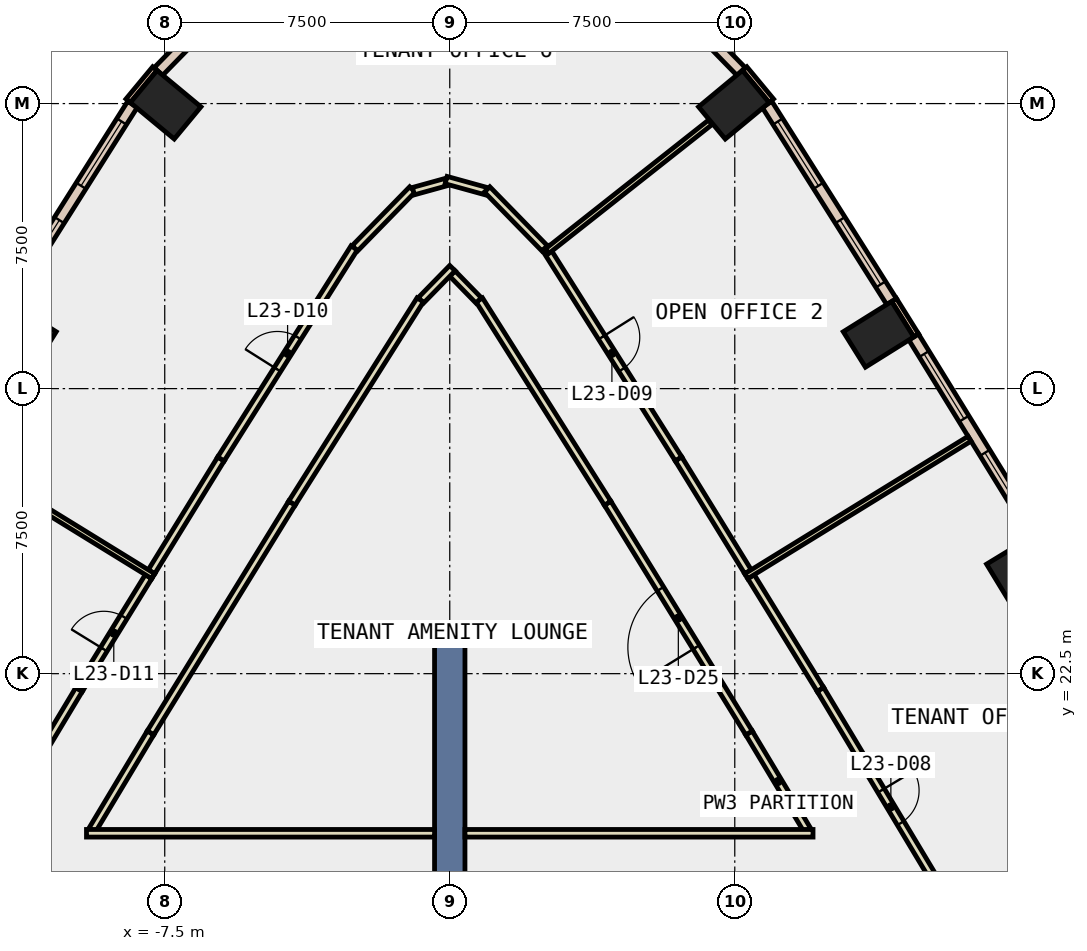
"""IFC4 building model, lengths in metres.
Left out: names, types, materials, properties, quantities, classifications, styles, units other than length and angle.
Written with IfcOpenShell. Run it as: python <this file> out.ifc"""

import sys

from ifc_helpers import new_model, si_unit, direction, frame, frame_2d, origin, origin_2d, place, context, subcontext, project, spatial, rectangle, extrude, element, fill, save


model = new_model("IFC4")
c1 = context("Model", 3, precision=1e-05, world=origin(), true_north=direction((0.0, 1.0)))
c2 = subcontext(c1, "Body", "Model", "MODEL_VIEW")
j1 = project(units=[si_unit("LENGTHUNIT", "METRE"), si_unit("PLANEANGLEUNIT", "RADIAN")], contexts=[c1])
p1 = place(None, origin())
s1 = spatial("IfcSite", under=j1, at=p1, CompositionType="ELEMENT")
p2 = place(p1, origin())
s2 = spatial("IfcBuilding", under=s1, at=p2, CompositionType="ELEMENT")
p3 = place(p2, frame((0.0, 0.0, 107.6)))
s3 = spatial("IfcBuildingStorey", under=s2, at=p3, CompositionType="ELEMENT", Elevation=107.6)
for number, where, z_axis, x_axis in (
    (1, (15.053, 25.302, -0.4), (0.0, 0.0, 1.0), (-0.52, 0.854, 0.0)),
    (2, (11.283, 31.428, -0.4), (0.0, 0.0, 1.0), (-0.53, 0.848, 0.0)),
    (3, (7.476, 37.47, -0.4), (0.0, 0.0, 1.0), (-0.638, 0.77, 0.0)),
    (4, (-7.476, 37.47, -0.4), (0.0, 0.0, 1.0), (0.638, 0.77, 0.0)),
    (5, (-11.283, 31.428, -0.4), (0.0, 0.0, 1.0), (0.53, 0.848, 0.0)),
):
    element("IfcColumn", number, at=place(p3, frame(where, z_axis=z_axis, x_axis=x_axis)), inside=s3, PredefinedType="COLUMN", context=c2, shape_type="SweptSolid", body=[
        extrude(rectangle(XDim=1.1, YDim=1.5, at=origin_2d()), origin(), (0.0, 0.0, 1.0), 4.2),
    ])
p4 = place(p3, frame((0.0, 14.5, -0.4), z_axis=(0.0, 0.0, 1.0), x_axis=(0.0, 1.0, 0.0)))
e6 = element("IfcWall", 6, at=p4, inside=s3, PredefinedType="SHEAR", context=c2, shape_type="SweptSolid", body=[
    extrude(rectangle(XDim=9.0, YDim=0.8, at=frame_2d((4.5, 0.0))), origin(), (0.0, 0.0, 1.0), 4.2),
])
p5 = place(p3, frame((12.274, 31.399, 0.0), z_axis=(0.0, 0.0, 1.0), x_axis=(-0.529879262372, 0.848073090782, 0.0)))
e7 = element("IfcWall", 7, at=p5, inside=s3, PredefinedType="STANDARD", context=c2, shape_type="SweptSolid", body=[
    extrude(rectangle(XDim=1.1, YDim=0.15, at=frame_2d((0.55, 0.0))), origin(), (0.0, 0.0, 1.0), 3.8),
])
for number, where, z_axis, x_axis in (
    (8, (8.462, 37.574, 0.0), (0.0, 0.0, 1.0), (-0.639, 0.77, 0.0)),
    (9, (-7.76, 38.42, 0.0), (0.0, 0.0, 1.0), (-0.639, -0.77, 0.0)),
):
    element("IfcWall", number, at=place(p3, frame(where, z_axis=z_axis, x_axis=x_axis)), inside=s3, PredefinedType="STANDARD", context=c2, shape_type="SweptSolid", body=[
        extrude(rectangle(XDim=1.099, YDim=0.15, at=frame_2d((0.55, 0.0))), origin(), (0.0, 0.0, 1.0), 3.8),
    ])
p6 = place(p3, frame((15.406, 26.16, 0.0), z_axis=(0.0, 0.0, 1.0), x_axis=(-0.524121974895, 0.851643208998, 0.0)))
e10 = element("IfcWall", 10, at=p6, inside=s3, PredefinedType="STANDARD", context=c2, shape_type="SweptSolid", body=[
    extrude(rectangle(XDim=6.104, YDim=0.3, at=frame_2d((3.052, 0.0))), origin(), (0.0, 0.0, 1.0), 3.8),
])
p7 = place(p6, frame((0.526, 0.0, 0.9)))
e11 = element("IfcOpeningElement", 11, at=p7, cuts=e10, PredefinedType="OPENING", context=c2, shape_type="SweptSolid", body=[
    extrude(rectangle(XDim=2.0, YDim=2.6, at=frame_2d((1.0, 1.3))), frame((0.0, 0.16, 0.0), z_axis=(0.0, -1.0, 0.0), x_axis=(1.0, 0.0, 0.0)), (0.0, 0.0, 1.0), 0.32),
])
p8 = place(p6, frame((3.578, 0.0, 0.9)))
e12 = element("IfcOpeningElement", 12, at=p8, cuts=e10, PredefinedType="OPENING", context=c2, shape_type="SweptSolid", body=[
    extrude(rectangle(XDim=2.0, YDim=2.6, at=frame_2d((1.0, 1.3))), frame((0.0, 0.16, 0.0), z_axis=(0.0, -1.0, 0.0), x_axis=(1.0, 0.0, 0.0)), (0.0, 0.0, 1.0), 0.32),
])
p9 = place(p3, frame((11.626, 32.29, 0.0), z_axis=(0.0, 0.0, 1.0), x_axis=(-0.534018429465, 0.845472836342, 0.0)))
e13 = element("IfcWall", 13, at=p9, inside=s3, PredefinedType="STANDARD", context=c2, shape_type="SweptSolid", body=[
    extrude(rectangle(XDim=6.138, YDim=0.3, at=frame_2d((3.069, 0.0))), origin(), (0.0, 0.0, 1.0), 3.8),
])
p10 = place(p9, frame((0.535, 0.0, 0.9)))
e14 = element("IfcOpeningElement", 14, at=p10, cuts=e13, PredefinedType="OPENING", context=c2, shape_type="SweptSolid", body=[
    extrude(rectangle(XDim=2.0, YDim=2.6, at=frame_2d((1.0, 1.3))), frame((0.0, 0.16, 0.0), z_axis=(0.0, -1.0, 0.0), x_axis=(1.0, 0.0, 0.0)), (0.0, 0.0, 1.0), 0.32),
])
p11 = place(p9, frame((3.604, 0.0, 0.9)))
e15 = element("IfcOpeningElement", 15, at=p11, cuts=e13, PredefinedType="OPENING", context=c2, shape_type="SweptSolid", body=[
    extrude(rectangle(XDim=2.0, YDim=2.6, at=frame_2d((1.0, 1.3))), frame((0.0, 0.16, 0.0), z_axis=(0.0, -1.0, 0.0), x_axis=(1.0, 0.0, 0.0)), (0.0, 0.0, 1.0), 0.32),
])
p12 = place(p3, frame((7.668, 38.343, 0.0), z_axis=(0.0, 0.0, 1.0), x_axis=(-0.698695735804, 0.715418946331, 0.0)))
e16 = element("IfcWall", 16, at=p12, inside=s3, PredefinedType="STANDARD", context=c2, shape_type="SweptSolid", body=[
    extrude(rectangle(XDim=3.65, YDim=0.3, at=frame_2d((1.825, 0.0))), origin(), (0.0, 0.0, 1.0), 3.8),
])
p13 = place(p12, frame((1.125, 0.0, 0.9)))
e17 = element("IfcOpeningElement", 17, at=p13, cuts=e16, PredefinedType="OPENING", context=c2, shape_type="SweptSolid", body=[
    extrude(rectangle(XDim=1.4, YDim=2.6, at=frame_2d((0.7, 1.3))), frame((0.0, 0.16, 0.0), z_axis=(0.0, -1.0, 0.0), x_axis=(1.0, 0.0, 0.0)), (0.0, 0.0, 1.0), 0.32),
])
p14 = place(p3, frame((-5.118, 40.954, 0.0), z_axis=(0.0, 0.0, 1.0), x_axis=(-0.698695735804, -0.715418946331, 0.0)))
e18 = element("IfcWall", 18, at=p14, inside=s3, PredefinedType="STANDARD", context=c2, shape_type="SweptSolid", body=[
    extrude(rectangle(XDim=3.65, YDim=0.3, at=frame_2d((1.825, 0.0))), origin(), (0.0, 0.0, 1.0), 3.8),
])
p15 = place(p14, frame((1.125, 0.0, 0.9)))
e19 = element("IfcOpeningElement", 19, at=p15, cuts=e18, PredefinedType="OPENING", context=c2, shape_type="SweptSolid", body=[
    extrude(rectangle(XDim=1.4, YDim=2.6, at=frame_2d((0.7, 1.3))), frame((0.0, 0.16, 0.0), z_axis=(0.0, -1.0, 0.0), x_axis=(1.0, 0.0, 0.0)), (0.0, 0.0, 1.0), 0.32),
])
p16 = place(p3, frame((-8.348, 37.48, 0.0), z_axis=(0.0, 0.0, 1.0), x_axis=(-0.534018429465, -0.845472836342, 0.0)))
e20 = element("IfcWall", 20, at=p16, inside=s3, PredefinedType="STANDARD", context=c2, shape_type="SweptSolid", body=[
    extrude(rectangle(XDim=6.138, YDim=0.3, at=frame_2d((3.069, 0.0))), origin(), (0.0, 0.0, 1.0), 3.8),
])
p17 = place(p16, frame((0.535, 0.0, 0.9)))
e21 = element("IfcOpeningElement", 21, at=p17, cuts=e20, PredefinedType="OPENING", context=c2, shape_type="SweptSolid", body=[
    extrude(rectangle(XDim=2.0, YDim=2.6, at=frame_2d((1.0, 1.3))), frame((0.0, 0.16, 0.0), z_axis=(0.0, -1.0, 0.0), x_axis=(1.0, 0.0, 0.0)), (0.0, 0.0, 1.0), 0.32),
])
p18 = place(p16, frame((3.604, 0.0, 0.9)))
e22 = element("IfcOpeningElement", 22, at=p18, cuts=e20, PredefinedType="OPENING", context=c2, shape_type="SweptSolid", body=[
    extrude(rectangle(XDim=2.0, YDim=2.6, at=frame_2d((1.0, 1.3))), frame((0.0, 0.16, 0.0), z_axis=(0.0, -1.0, 0.0), x_axis=(1.0, 0.0, 0.0)), (0.0, 0.0, 1.0), 0.32),
])
p19 = place(p3, frame((9.407, 18.386, 0.0), z_axis=(0.0, 0.0, 1.0), x_axis=(-0.514399309837, 0.857550785691, 0.0)))
e23 = element("IfcWall", 23, at=p19, inside=s3, PredefinedType="PARTITIONING", context=c2, shape_type="SweptSolid", body=[
    extrude(rectangle(XDim=2.978, YDim=0.2, at=frame_2d((1.489, 0.0))), origin(), (0.0, 0.0, 1.0), 3.8),
])
p20 = place(p3, frame((7.875, 20.94, 0.0), z_axis=(0.0, 0.0, 1.0), x_axis=(-0.524183774504, 0.851605172921, 0.0)))
e24 = element("IfcWall", 24, at=p20, inside=s3, PredefinedType="PARTITIONING", context=c2, shape_type="SweptSolid", body=[
    extrude(rectangle(XDim=7.099, YDim=0.2, at=frame_2d((3.549, 0.0))), origin(), (0.0, 0.0, 1.0), 3.8),
])
p21 = place(p20, frame((2.649, 0.0, 0.0)))
e25 = element("IfcOpeningElement", 25, at=p21, cuts=e24, PredefinedType="OPENING", context=c2, shape_type="SweptSolid", body=[
    extrude(rectangle(XDim=1.8, YDim=2.1, at=frame_2d((0.9, 1.05))), frame((0.0, 0.11, 0.0), z_axis=(0.0, -1.0, 0.0), x_axis=(1.0, 0.0, 0.0)), (0.0, 0.0, 1.0), 0.22),
])
p22 = place(p3, frame((4.154, 26.985, 0.0), z_axis=(0.0, 0.0, 1.0), x_axis=(-0.53384777413, 0.84558060175, 0.0)))
e26 = element("IfcWall", 26, at=p22, inside=s3, PredefinedType="PARTITIONING", context=c2, shape_type="SweptSolid", body=[
    extrude(rectangle(XDim=6.326, YDim=0.2, at=frame_2d((3.163, 0.0))), origin(), (0.0, 0.0, 1.0), 3.8),
])
p23 = place(p3, frame((0.76, 32.321, 0.0), z_axis=(0.0, 0.0, 1.0), x_axis=(-0.698898447714, 0.715220916769, 0.0)))
e27 = element("IfcWall", 27, at=p23, inside=s3, PredefinedType="PARTITIONING", context=c2, shape_type="SweptSolid", body=[
    extrude(rectangle(XDim=0.987, YDim=0.2, at=frame_2d((0.494, 0.0))), origin(), (0.0, 0.0, 1.0), 3.8),
])
p24 = place(p3, frame((0.07, 33.17, 0.0), z_axis=(0.0, 0.0, 1.0), x_axis=(-0.699145664909, -0.714979257908, 0.0)))
e28 = element("IfcWall", 28, at=p24, inside=s3, PredefinedType="PARTITIONING", context=c2, shape_type="SweptSolid", body=[
    extrude(rectangle(XDim=1.187, YDim=0.2, at=frame_2d((0.594, 0.0))), origin(), (0.0, 0.0, 1.0), 3.8),
])
p25 = place(p3, frame((-0.777, 32.334, 0.0), z_axis=(0.0, 0.0, 1.0), x_axis=(-0.53384777413, -0.84558060175, 0.0)))
e29 = element("IfcWall", 29, at=p25, inside=s3, PredefinedType="PARTITIONING", context=c2, shape_type="SweptSolid", body=[
    extrude(rectangle(XDim=6.326, YDim=0.2, at=frame_2d((3.163, 0.0))), origin(), (0.0, 0.0, 1.0), 3.8),
])
p26 = place(p3, frame((-4.154, 26.985, 0.0), z_axis=(0.0, 0.0, 1.0), x_axis=(-0.524183774504, -0.851605172921, 0.0)))
e30 = element("IfcWall", 30, at=p26, inside=s3, PredefinedType="PARTITIONING", context=c2, shape_type="SweptSolid", body=[
    extrude(rectangle(XDim=7.099, YDim=0.2, at=frame_2d((3.549, 0.0))), origin(), (0.0, 0.0, 1.0), 3.8),
])
p27 = place(p3, frame((-7.875, 20.94, 0.0), z_axis=(0.0, 0.0, 1.0), x_axis=(-0.514399309837, -0.857550785691, 0.0)))
e31 = element("IfcWall", 31, at=p27, inside=s3, PredefinedType="PARTITIONING", context=c2, shape_type="SweptSolid", body=[
    extrude(rectangle(XDim=2.978, YDim=0.2, at=frame_2d((1.489, 0.0))), origin(), (0.0, 0.0, 1.0), 3.8),
])
p28 = place(p3, frame((7.927, 25.052, 0.0), z_axis=(0.0, 0.0, 1.0), x_axis=(0.524140390501, -0.851631875311, 0.0)))
e32 = element("IfcWall", 32, at=p28, inside=s3, PredefinedType="PARTITIONING", context=c2, shape_type="SweptSolid", body=[
    extrude(rectangle(XDim=3.487, YDim=0.2, at=frame_2d((1.744, 0.0))), origin(), (0.0, 0.0, 1.0), 3.8),
])
p29 = place(p3, frame((9.755, 22.082, 0.0), z_axis=(0.0, 0.0, 1.0), x_axis=(0.514582342012, -0.857440967816, 0.0)))
e33 = element("IfcWall", 33, at=p29, inside=s3, PredefinedType="PARTITIONING", context=c2, shape_type="SweptSolid", body=[
    extrude(rectangle(XDim=7.049, YDim=0.2, at=frame_2d((3.524, 0.0))), origin(), (0.0, 0.0, 1.0), 3.8),
])
p30 = place(p29, frame((3.1, 0.0, 0.0)))
e34 = element("IfcOpeningElement", 34, at=p30, cuts=e33, PredefinedType="OPENING", context=c2, shape_type="SweptSolid", body=[
    extrude(rectangle(XDim=1.0, YDim=2.1, at=frame_2d((0.5, 1.05))), frame((0.0, 0.11, 0.0), z_axis=(0.0, -1.0, 0.0), x_axis=(1.0, 0.0, 0.0)), (0.0, 0.0, 1.0), 0.22),
])
p31 = place(p3, frame((2.513, 33.705, 0.0), z_axis=(0.0, 0.0, 1.0), x_axis=(0.533874165031, -0.845563939577, 0.0)))
e35 = element("IfcWall", 35, at=p31, inside=s3, PredefinedType="PARTITIONING", context=c2, shape_type="SweptSolid", body=[
    extrude(rectangle(XDim=6.571, YDim=0.2, at=frame_2d((3.286, 0.0))), origin(), (0.0, 0.0, 1.0), 3.8),
])
p32 = place(p31, frame((2.785, 0.0, 0.0)))
e36 = element("IfcOpeningElement", 36, at=p32, cuts=e35, PredefinedType="OPENING", context=c2, shape_type="SweptSolid", body=[
    extrude(rectangle(XDim=1.0, YDim=2.1, at=frame_2d((0.5, 1.05))), frame((0.0, 0.11, 0.0), z_axis=(0.0, -1.0, 0.0), x_axis=(1.0, 0.0, 0.0)), (0.0, 0.0, 1.0), 0.22),
])
for number, where, z_axis, x_axis in (
    (37, (6.021, 28.149, 0.0), (0.0, 0.0, 1.0), (0.524, -0.852, 0.0)),
    (38, (-7.848, 25.18, 0.0), (0.0, 0.0, 1.0), (0.524, 0.852, 0.0)),
):
    element("IfcWall", number, at=place(p3, frame(where, z_axis=z_axis, x_axis=x_axis)), inside=s3, PredefinedType="PARTITIONING", context=c2, shape_type="SweptSolid", body=[
        extrude(rectangle(XDim=3.486, YDim=0.2, at=frame_2d((1.743, 0.0))), origin(), (0.0, 0.0, 1.0), 3.8),
    ])
p33 = place(p3, frame((-6.021, 28.149, 0.0), z_axis=(0.0, 0.0, 1.0), x_axis=(0.533874165031, 0.845563939577, 0.0)))
e39 = element("IfcWall", 39, at=p33, inside=s3, PredefinedType="PARTITIONING", context=c2, shape_type="SweptSolid", body=[
    extrude(rectangle(XDim=6.571, YDim=0.2, at=frame_2d((3.286, 0.0))), origin(), (0.0, 0.0, 1.0), 3.8),
])
p34 = place(p33, frame((2.785, 0.0, 0.0)))
e40 = element("IfcOpeningElement", 40, at=p34, cuts=e39, PredefinedType="OPENING", context=c2, shape_type="SweptSolid", body=[
    extrude(rectangle(XDim=1.0, YDim=2.1, at=frame_2d((0.5, 1.05))), frame((0.0, 0.11, 0.0), z_axis=(0.0, -1.0, 0.0), x_axis=(1.0, 0.0, 0.0)), (0.0, 0.0, 1.0), 0.22),
])
p35 = place(p3, frame((-2.496, 33.692, 0.0), z_axis=(0.0, 0.0, 1.0), x_axis=(0.698771726105, 0.715344724449, 0.0)))
e41 = element("IfcWall", 41, at=p35, inside=s3, PredefinedType="PARTITIONING", context=c2, shape_type="SweptSolid", body=[
    extrude(rectangle(XDim=2.166, YDim=0.2, at=frame_2d((1.083, 0.0))), origin(), (0.0, 0.0, 1.0), 3.8),
])
p36 = place(p3, frame((-0.956, 35.196, 0.0), z_axis=(0.0, 0.0, 1.0), x_axis=(0.963772226389, 0.266726630919, 0.0)))
e42 = element("IfcWall", 42, at=p36, inside=s3, PredefinedType="PARTITIONING", context=c2, shape_type="SweptSolid", body=[
    extrude(rectangle(XDim=0.892, YDim=0.2, at=frame_2d((0.446, 0.0))), origin(), (0.0, 0.0, 1.0), 3.8),
])
p37 = place(p3, frame((-0.096, 35.487, 0.0), z_axis=(0.0, 0.0, 1.0), x_axis=(0.963802560401, -0.266616999767, 0.0)))
e43 = element("IfcWall", 43, at=p37, inside=s3, PredefinedType="PARTITIONING", context=c2, shape_type="SweptSolid", body=[
    extrude(rectangle(XDim=1.092, YDim=0.2, at=frame_2d((0.546, 0.0))), origin(), (0.0, 0.0, 1.0), 3.8),
])
p38 = place(p3, frame((0.983, 35.241, 0.0), z_axis=(0.0, 0.0, 1.0), x_axis=(0.698771726105, -0.715344724449, 0.0)))
e44 = element("IfcWall", 44, at=p38, inside=s3, PredefinedType="PARTITIONING", context=c2, shape_type="SweptSolid", body=[
    extrude(rectangle(XDim=2.166, YDim=0.2, at=frame_2d((1.083, 0.0))), origin(), (0.0, 0.0, 1.0), 3.8),
])
p39 = place(p3, frame((-11.549, 19.092, 0.0), z_axis=(0.0, 0.0, 1.0), x_axis=(0.514536939864, 0.857468213705, 0.0)))
e45 = element("IfcWall", 45, at=p39, inside=s3, PredefinedType="PARTITIONING", context=c2, shape_type="SweptSolid", body=[
    extrude(rectangle(XDim=3.487, YDim=0.2, at=frame_2d((1.744, 0.0))), origin(), (0.0, 0.0, 1.0), 3.8),
])
p40 = place(p3, frame((-9.755, 22.082, 0.0), z_axis=(0.0, 0.0, 1.0), x_axis=(0.524140390501, 0.851631875311, 0.0)))
e46 = element("IfcWall", 46, at=p40, inside=s3, PredefinedType="PARTITIONING", context=c2, shape_type="SweptSolid", body=[
    extrude(rectangle(XDim=3.487, YDim=0.2, at=frame_2d((1.744, 0.0))), origin(), (0.0, 0.0, 1.0), 3.8),
])
p41 = place(p40, frame((1.244, 0.0, 0.0)))
e47 = element("IfcOpeningElement", 47, at=p41, cuts=e46, PredefinedType="OPENING", context=c2, shape_type="SweptSolid", body=[
    extrude(rectangle(XDim=1.0, YDim=2.1, at=frame_2d((0.5, 1.05))), frame((0.0, 0.11, 0.0), z_axis=(0.0, -1.0, 0.0), x_axis=(1.0, 0.0, 0.0)), (0.0, 0.0, 1.0), 0.22),
])
p42 = place(p3, frame((-9.559, 18.3, 0.0), z_axis=(0.0, 0.0, 1.0), x_axis=(1.0, 0.0, 0.0)))
e48 = element("IfcWall", 48, at=p42, inside=s3, PredefinedType="PARTITIONING", context=c2, shape_type="SweptSolid", body=[
    extrude(rectangle(XDim=9.159, YDim=0.2, at=frame_2d((4.58, 0.0))), origin(), (0.0, 0.0, 1.0), 3.8),
])
p43 = place(p3, frame((13.507, 16.025, 0.0), z_axis=(0.0, 0.0, 1.0), x_axis=(0.860289301319, 0.509806157315, 0.0)))
e49 = element("IfcWall", 49, at=p43, inside=s3, PredefinedType="PARTITIONING", context=c2, shape_type="SweptSolid", body=[
    extrude(rectangle(XDim=5.33, YDim=0.15, at=frame_2d((2.665, 0.0))), origin(), (0.0, 0.0, 1.0), 3.8),
])
p44 = place(p3, frame((7.802, 25.064, 0.0), z_axis=(0.0, 0.0, 1.0), x_axis=(0.851596352662, 0.524198103901, 0.0)))
e50 = element("IfcWall", 50, at=p44, inside=s3, PredefinedType="PARTITIONING", context=c2, shape_type="SweptSolid", body=[
    extrude(rectangle(XDim=6.9, YDim=0.15, at=frame_2d((3.45, 0.0))), origin(), (0.0, 0.0, 1.0), 3.8),
])
p45 = place(p3, frame((2.566, 33.62, 0.0), z_axis=(0.0, 0.0, 1.0), x_axis=(0.784838195876, 0.619700739304, 0.0)))
e51 = element("IfcWall", 51, at=p45, inside=s3, PredefinedType="PARTITIONING", context=c2, shape_type="SweptSolid", body=[
    extrude(rectangle(XDim=5.469, YDim=0.15, at=frame_2d((2.734, 0.0))), origin(), (0.0, 0.0, 1.0), 3.8),
])
p46 = place(p3, frame((-7.802, 25.064, 0.0), z_axis=(0.0, 0.0, 1.0), x_axis=(-0.851596352662, 0.524198103901, 0.0)))
e52 = element("IfcWall", 52, at=p46, inside=s3, PredefinedType="PARTITIONING", context=c2, shape_type="SweptSolid", body=[
    extrude(rectangle(XDim=6.9, YDim=0.15, at=frame_2d((3.45, 0.0))), origin(), (0.0, 0.0, 1.0), 3.8),
])
p47 = place(p3, frame((0.4, 18.3, 0.0), z_axis=(0.0, 0.0, 1.0), x_axis=(1.0, 0.0, 0.0)))
e53 = element("IfcWall", 53, at=p47, inside=s3, PredefinedType="PARTITIONING", context=c2, shape_type="SweptSolid", body=[
    extrude(rectangle(XDim=9.159, YDim=0.2, at=frame_2d((4.58, 0.0))), origin(), (0.0, 0.0, 1.0), 3.8),
])
p48 = place(p7, origin())
e54 = element("IfcWindow", 54, at=p48, inside=s3, PartitioningType="SINGLE_PANEL", PredefinedType="WINDOW", context=c2, shape_type="SweptSolid", body=[
    extrude(rectangle(XDim=2.0, YDim=2.6, at=frame_2d((1.0, 1.3))), frame((0.0, 0.03, 0.0), z_axis=(0.0, -1.0, 0.0), x_axis=(1.0, 0.0, 0.0)), (0.0, 0.0, 1.0), 0.06),
])
fill(e11, e54)
p49 = place(p8, origin())
e55 = element("IfcWindow", 55, at=p49, inside=s3, PartitioningType="SINGLE_PANEL", PredefinedType="WINDOW", context=c2, shape_type="SweptSolid", body=[
    extrude(rectangle(XDim=2.0, YDim=2.6, at=frame_2d((1.0, 1.3))), frame((0.0, 0.03, 0.0), z_axis=(0.0, -1.0, 0.0), x_axis=(1.0, 0.0, 0.0)), (0.0, 0.0, 1.0), 0.06),
])
fill(e12, e55)
p50 = place(p10, origin())
e56 = element("IfcWindow", 56, at=p50, inside=s3, PartitioningType="SINGLE_PANEL", PredefinedType="WINDOW", context=c2, shape_type="SweptSolid", body=[
    extrude(rectangle(XDim=2.0, YDim=2.6, at=frame_2d((1.0, 1.3))), frame((0.0, 0.03, 0.0), z_axis=(0.0, -1.0, 0.0), x_axis=(1.0, 0.0, 0.0)), (0.0, 0.0, 1.0), 0.06),
])
fill(e14, e56)
p51 = place(p11, origin())
e57 = element("IfcWindow", 57, at=p51, inside=s3, PartitioningType="SINGLE_PANEL", PredefinedType="WINDOW", context=c2, shape_type="SweptSolid", body=[
    extrude(rectangle(XDim=2.0, YDim=2.6, at=frame_2d((1.0, 1.3))), frame((0.0, 0.03, 0.0), z_axis=(0.0, -1.0, 0.0), x_axis=(1.0, 0.0, 0.0)), (0.0, 0.0, 1.0), 0.06),
])
fill(e15, e57)
p52 = place(p17, origin())
e58 = element("IfcWindow", 58, at=p52, inside=s3, PartitioningType="SINGLE_PANEL", PredefinedType="WINDOW", context=c2, shape_type="SweptSolid", body=[
    extrude(rectangle(XDim=2.0, YDim=2.6, at=frame_2d((1.0, 1.3))), frame((0.0, 0.03, 0.0), z_axis=(0.0, -1.0, 0.0), x_axis=(1.0, 0.0, 0.0)), (0.0, 0.0, 1.0), 0.06),
])
fill(e21, e58)
p53 = place(p18, origin())
e59 = element("IfcWindow", 59, at=p53, inside=s3, PartitioningType="SINGLE_PANEL", PredefinedType="WINDOW", context=c2, shape_type="SweptSolid", body=[
    extrude(rectangle(XDim=2.0, YDim=2.6, at=frame_2d((1.0, 1.3))), frame((0.0, 0.03, 0.0), z_axis=(0.0, -1.0, 0.0), x_axis=(1.0, 0.0, 0.0)), (0.0, 0.0, 1.0), 0.06),
])
fill(e22, e59)
p54 = place(p30, origin())
e60 = element("IfcDoor", 60, at=p54, inside=s3, OperationType="SINGLE_SWING_LEFT", PredefinedType="DOOR", context=c2, shape_type="SweptSolid", body=[
    extrude(rectangle(XDim=1.0, YDim=2.1, at=frame_2d((0.5, 1.05))), frame((0.0, 0.025, 0.0), z_axis=(0.0, -1.0, 0.0), x_axis=(1.0, 0.0, 0.0)), (0.0, 0.0, 1.0), 0.05),
])
fill(e34, e60)
p55 = place(p32, origin())
e61 = element("IfcDoor", 61, at=p55, inside=s3, OperationType="SINGLE_SWING_LEFT", PredefinedType="DOOR", context=c2, shape_type="SweptSolid", body=[
    extrude(rectangle(XDim=1.0, YDim=2.1, at=frame_2d((0.5, 1.05))), frame((0.0, 0.025, 0.0), z_axis=(0.0, -1.0, 0.0), x_axis=(1.0, 0.0, 0.0)), (0.0, 0.0, 1.0), 0.05),
])
fill(e36, e61)
p56 = place(p34, origin())
e62 = element("IfcDoor", 62, at=p56, inside=s3, OperationType="SINGLE_SWING_LEFT", PredefinedType="DOOR", context=c2, shape_type="SweptSolid", body=[
    extrude(rectangle(XDim=1.0, YDim=2.1, at=frame_2d((0.5, 1.05))), frame((0.0, 0.025, 0.0), z_axis=(0.0, -1.0, 0.0), x_axis=(1.0, 0.0, 0.0)), (0.0, 0.0, 1.0), 0.05),
])
fill(e40, e62)
p57 = place(p41, origin())
e63 = element("IfcDoor", 63, at=p57, inside=s3, OperationType="SINGLE_SWING_LEFT", PredefinedType="DOOR", context=c2, shape_type="SweptSolid", body=[
    extrude(rectangle(XDim=1.0, YDim=2.1, at=frame_2d((0.5, 1.05))), frame((0.0, 0.025, 0.0), z_axis=(0.0, -1.0, 0.0), x_axis=(1.0, 0.0, 0.0)), (0.0, 0.0, 1.0), 0.05),
])
fill(e47, e63)
p58 = place(p21, origin())
e64 = element("IfcDoor", 64, at=p58, inside=s3, OperationType="DOUBLE_DOOR_SINGLE_SWING", PredefinedType="DOOR", context=c2, shape_type="SweptSolid", body=[
    extrude(rectangle(XDim=1.8, YDim=2.1, at=frame_2d((0.9, 1.05))), frame((0.0, 0.025, 0.0), z_axis=(0.0, -1.0, 0.0), x_axis=(1.0, 0.0, 0.0)), (0.0, 0.0, 1.0), 0.05),
])
fill(e25, e64)
save(model, sys.argv[1])
